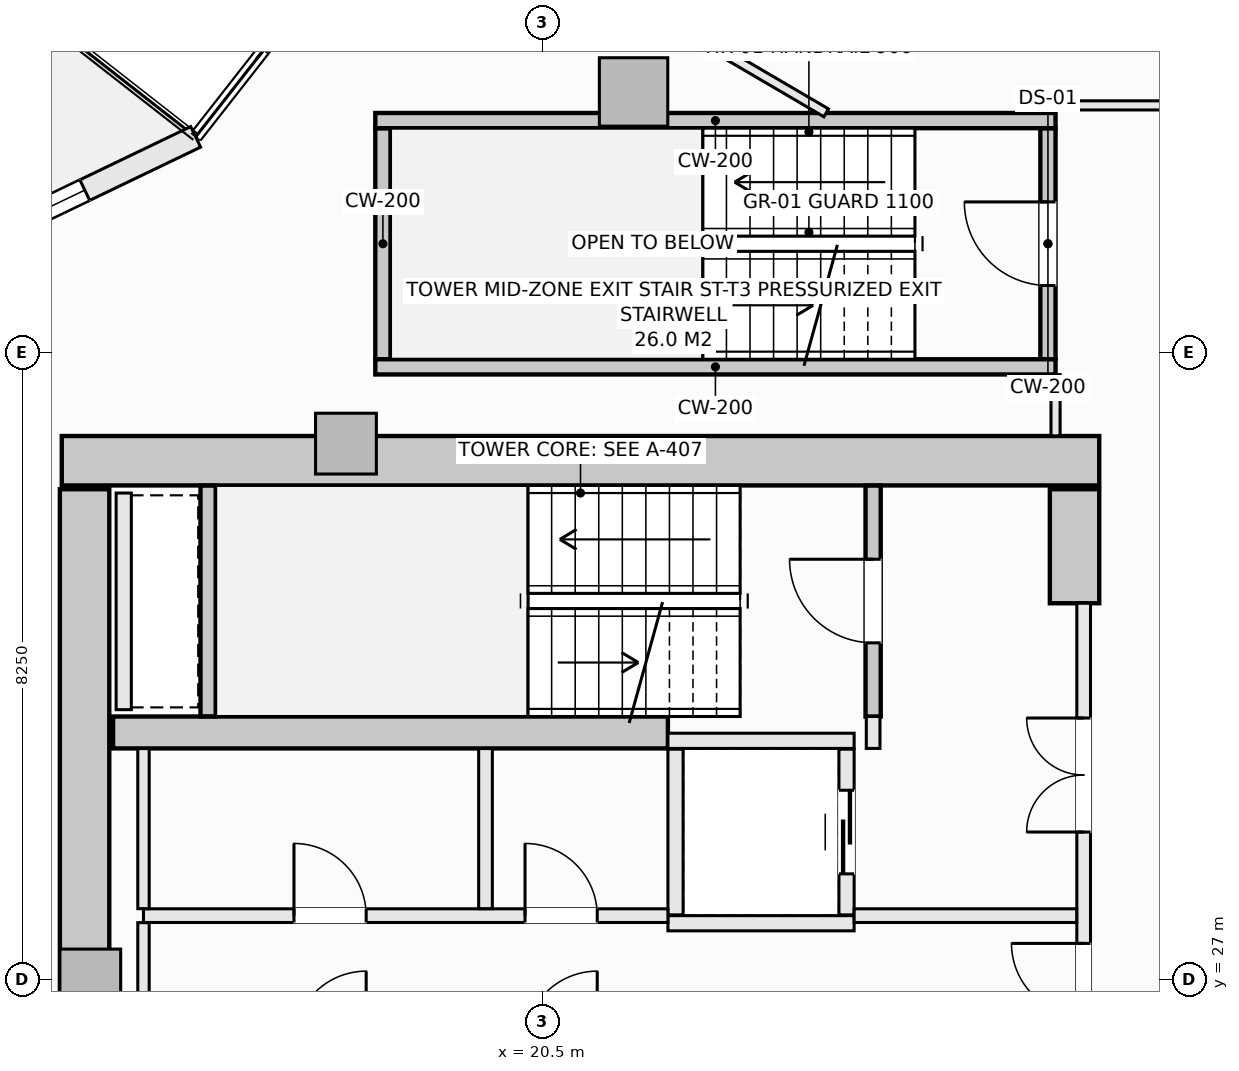
"""IFC4 building model, lengths in metres.
Left out: names, types, materials, properties, quantities, classifications, styles, units other than length and angle.
Written with IfcOpenShell. Run it as: python <this file> out.ifc"""

import sys

from ifc_helpers import new_model, si_unit, direction, frame, frame_2d, origin, origin_2d, place, context, subcontext, project, spatial, rectangle, extrude, element, fill, save


model = new_model("IFC4")
c1 = context("Model", 3, precision=1e-05, world=origin(), true_north=direction((0.0, 1.0)))
c2 = subcontext(c1, "Body", "Model", "MODEL_VIEW")
j1 = project(units=[si_unit("LENGTHUNIT", "METRE"), si_unit("PLANEANGLEUNIT", "RADIAN")], contexts=[c1])
p1 = place(None, origin())
s1 = spatial("IfcSite", under=j1, at=p1, CompositionType="ELEMENT")
p2 = place(p1, origin())
s2 = spatial("IfcBuilding", under=s1, at=p2, CompositionType="ELEMENT")
p3 = place(p2, frame((0.0, 0.0, 142.7)))
s3 = spatial("IfcBuildingStorey", under=s2, at=p3, CompositionType="ELEMENT", Elevation=142.7)
p4 = place(p3, frame((14.175, 33.825, -0.27), z_axis=(0.0, 0.0, 1.0), x_axis=(1.0, 0.0, 0.0)))
e1 = element("IfcWall", 1, at=p4, inside=s3, PredefinedType="SHEAR", context=c2, shape_type="SweptSolid", body=[
    extrude(rectangle(XDim=13.65, YDim=0.65, at=frame_2d((6.825, 0.0))), origin(), (0.0, 0.0, 1.0), 3.4),
])
p5 = place(p3, frame((14.475, 20.55, -0.27), z_axis=(0.0, 0.0, 1.0), x_axis=(0.0, 1.0, 0.0)))
e2 = element("IfcWall", 2, at=p5, inside=s3, PredefinedType="SHEAR", context=c2, shape_type="SweptSolid", body=[
    extrude(rectangle(XDim=12.9, YDim=0.65, at=frame_2d((6.45, 0.0))), origin(), (0.0, 0.0, 1.0), 3.4),
])
p6 = place(p3, frame((27.5, 31.95, -0.27), z_axis=(0.0, 0.0, 1.0), x_axis=(0.0, 1.0, 0.0)))
e3 = element("IfcWall", 3, at=p6, inside=s3, PredefinedType="SHEAR", context=c2, shape_type="SweptSolid", body=[
    extrude(rectangle(XDim=1.5, YDim=0.65, at=frame_2d((0.75, 0.0))), origin(), (0.0, 0.0, 1.0), 3.4),
])
p7 = place(p3, frame((14.85, 30.25, -0.27), z_axis=(0.0, 0.0, 1.0), x_axis=(1.0, 0.0, 0.0)))
e4 = element("IfcWall", 4, at=p7, inside=s3, PredefinedType="SHEAR", context=c2, shape_type="SweptSolid", body=[
    extrude(rectangle(XDim=7.3, YDim=0.42, at=frame_2d((3.65, 0.0))), origin(), (0.0, 0.0, 1.0), 3.4),
])
p8 = place(p3, frame((21.698, 38.677, -0.27), z_axis=(0.0, 0.0, 1.0), x_axis=(1.0, 0.0, 0.0)))
e5 = element("IfcColumn", 5, at=p8, inside=s3, PredefinedType="COLUMN", context=c2, shape_type="SweptSolid", body=[
    extrude(rectangle(XDim=0.9, YDim=0.9, at=origin_2d()), origin(), (0.0, 0.0, 1.0), 3.4),
])
for number, where, z_axis, x_axis in (
    (6, (17.914, 34.05, -0.27), (0.0, 0.0, 1.0), (1.0, 0.0, 0.0)),
    (7, (14.55, 27.0, -0.27), (0.0, 0.0, 1.0), (1.0, 0.0, 0.0)),
):
    element("IfcColumn", number, at=place(p3, frame(where, z_axis=z_axis, x_axis=x_axis)), inside=s3, PredefinedType="PILASTER", context=c2, shape_type="SweptSolid", body=[
        extrude(rectangle(XDim=0.8, YDim=0.8, at=origin_2d()), origin(), (0.0, 0.0, 1.0), 3.4),
    ])
p9 = place(p3, frame((11.127, 35.775, 0.0), z_axis=(0.0, 0.0, 1.0), x_axis=(0.901353070301, 0.433085029363, 0.0)))
e8 = element("IfcWall", 8, at=p9, inside=s3, PredefinedType="SOLIDWALL", context=c2, shape_type="SweptSolid", body=[
    extrude(rectangle(XDim=5.336, YDim=0.3, at=frame_2d((2.668, 0.0))), origin(), (0.0, 0.0, 1.0), 2.653),
])
p10 = place(p9, frame((1.618, 0.0, 0.74)))
e9 = element("IfcOpeningElement", 9, at=p10, cuts=e8, PredefinedType="OPENING", context=c2, shape_type="SweptSolid", body=[
    extrude(rectangle(XDim=2.1, YDim=1.7, at=frame_2d((1.05, 0.85))), frame((0.0, 0.16, 0.0), z_axis=(0.0, -1.0, 0.0), x_axis=(1.0, 0.0, 0.0)), (0.0, 0.0, 1.0), 0.32),
])
p11 = place(p3, frame((24.85, 30.46, -0.27), z_axis=(0.0, 0.0, 1.0), x_axis=(0.0, 1.0, 0.0)))
e10 = element("IfcWall", 10, at=p11, inside=s3, PredefinedType="SHEAR", context=c2, shape_type="SweptSolid", body=[
    extrude(rectangle(XDim=3.038, YDim=0.2, at=frame_2d((1.519, 0.0))), origin(), (0.0, 0.0, 1.0), 3.4),
])
p12 = place(p11, frame((0.969, 0.0, 0.27)))
e11 = element("IfcOpeningElement", 11, at=p12, cuts=e10, PredefinedType="OPENING", context=c2, shape_type="SweptSolid", body=[
    extrude(rectangle(XDim=1.1, YDim=2.15, at=frame_2d((0.55, 1.075))), frame((0.0, 0.11, 0.0), z_axis=(0.0, -1.0, 0.0), x_axis=(1.0, 0.0, 0.0)), (0.0, 0.0, 1.0), 0.22),
])
p13 = place(p3, frame((16.1, 30.462, -0.27), z_axis=(0.0, 0.0, 1.0), x_axis=(0.0, 1.0, 0.0)))
e12 = element("IfcWall", 12, at=p13, inside=s3, PredefinedType="SHEAR", context=c2, shape_type="SweptSolid", body=[
    extrude(rectangle(XDim=3.036, YDim=0.2, at=frame_2d((1.518, 0.0))), origin(), (0.0, 0.0, 1.0), 3.4),
])
p14 = place(p3, frame((27.15, 35.16, -0.27), z_axis=(0.0, 0.0, 1.0), x_axis=(0.0, 1.0, 0.0)))
e13 = element("IfcWall", 13, at=p14, inside=s3, PredefinedType="SHEAR", context=c2, shape_type="SweptSolid", body=[
    extrude(rectangle(XDim=3.04, YDim=0.2, at=frame_2d((1.52, 0.0))), origin(), (0.0, 0.0, 1.0), 3.4),
])
p15 = place(p14, frame((0.97, 0.0, 0.27)))
e14 = element("IfcOpeningElement", 14, at=p15, cuts=e13, PredefinedType="OPENING", context=c2, shape_type="SweptSolid", body=[
    extrude(rectangle(XDim=1.1, YDim=2.15, at=frame_2d((0.55, 1.075))), frame((0.0, 0.11, 0.0), z_axis=(0.0, -1.0, 0.0), x_axis=(1.0, 0.0, 0.0)), (0.0, 0.0, 1.0), 0.22),
])
p16 = place(p3, frame((18.4, 35.16, -0.27), z_axis=(0.0, 0.0, 1.0), x_axis=(0.0, 1.0, 0.0)))
e15 = element("IfcWall", 15, at=p16, inside=s3, PredefinedType="SHEAR", context=c2, shape_type="SweptSolid", body=[
    extrude(rectangle(XDim=3.04, YDim=0.2, at=frame_2d((1.52, 0.0))), origin(), (0.0, 0.0, 1.0), 3.4),
])
for number, where, z_axis, x_axis in (
    (16, (18.3, 38.3, -0.27), (0.0, 0.0, 1.0), (1.0, 0.0, 0.0)),
    (17, (18.3, 35.06, -0.27), (0.0, 0.0, 1.0), (1.0, 0.0, 0.0)),
):
    element("IfcWall", number, at=place(p3, frame(where, z_axis=z_axis, x_axis=x_axis)), inside=s3, PredefinedType="SHEAR", context=c2, shape_type="SweptSolid", body=[
        extrude(rectangle(XDim=8.95, YDim=0.2, at=frame_2d((4.475, 0.0))), origin(), (0.0, 0.0, 1.0), 3.4),
    ])
for number, where, z_axis, x_axis in (
    (18, (22.15, 30.14, 0.0), (0.0, 0.0, 1.0), (1.0, 0.0, 0.0)),
    (19, (22.15, 27.74, 0.0), (0.0, 0.0, 1.0), (1.0, 0.0, 0.0)),
):
    element("IfcWall", number, at=place(p3, frame(where, z_axis=z_axis, x_axis=x_axis)), inside=s3, PredefinedType="SOLIDWALL", context=c2, shape_type="SweptSolid", body=[
        extrude(rectangle(XDim=2.45, YDim=0.2, at=frame_2d((1.225, 0.0))), origin(), (0.0, 0.0, 1.0), 3.13),
    ])
p17 = place(p3, frame((22.25, 27.85, 0.0), z_axis=(0.0, 0.0, 1.0), x_axis=(0.0, 1.0, 0.0)))
e20 = element("IfcWall", 20, at=p17, inside=s3, PredefinedType="SOLIDWALL", context=c2, shape_type="SweptSolid", body=[
    extrude(rectangle(XDim=2.18, YDim=0.2, at=frame_2d((1.09, 0.0))), origin(), (0.0, 0.0, 1.0), 3.13),
])
p18 = place(p3, frame((24.5, 27.85, 0.0), z_axis=(0.0, 0.0, 1.0), x_axis=(0.0, 1.0, 0.0)))
e21 = element("IfcWall", 21, at=p18, inside=s3, PredefinedType="SOLIDWALL", context=c2, shape_type="SweptSolid", body=[
    extrude(rectangle(XDim=2.18, YDim=0.2, at=frame_2d((1.09, 0.0))), origin(), (0.0, 0.0, 1.0), 3.13),
])
p19 = place(p18, frame((0.54, 0.0, 0.0)))
e22 = element("IfcOpeningElement", 22, at=p19, cuts=e21, PredefinedType="OPENING", context=c2, shape_type="SweptSolid", body=[
    extrude(rectangle(XDim=1.1, YDim=2.2, at=frame_2d((0.55, 1.1))), frame((0.0, 0.11, 0.0), z_axis=(0.0, -1.0, 0.0), x_axis=(1.0, 0.0, 0.0)), (0.0, 0.0, 1.0), 0.22),
])
p20 = place(p3, frame((14.99, 30.55, 0.0), z_axis=(0.0, 0.0, 1.0), x_axis=(0.0, 1.0, 0.0)))
e23 = element("IfcWall", 23, at=p20, inside=s3, PredefinedType="SOLIDWALL", context=c2, shape_type="SweptSolid", body=[
    extrude(rectangle(XDim=2.85, YDim=0.2, at=frame_2d((1.425, 0.0))), origin(), (0.0, 0.0, 1.0), 3.13),
])
p21 = place(p3, frame((24.85, 30.04, 0.0), z_axis=(0.0, 0.0, 1.0), x_axis=(0.0, 1.0, 0.0)))
e24 = element("IfcWall", 24, at=p21, inside=s3, PredefinedType="SOLIDWALL", context=c2, shape_type="SweptSolid", body=[
    extrude(rectangle(XDim=0.42, YDim=0.18, at=frame_2d((0.21, 0.0))), origin(), (0.0, 0.0, 1.0), 3.13),
])
p22 = place(p3, frame((27.62, 22.05, 0.0), z_axis=(0.0, 0.0, 1.0), x_axis=(0.0, 1.0, 0.0)))
e25 = element("IfcWall", 25, at=p22, inside=s3, PredefinedType="SOLIDWALL", context=c2, shape_type="SweptSolid", body=[
    extrude(rectangle(XDim=9.9, YDim=0.18, at=frame_2d((4.95, 0.0))), origin(), (0.0, 0.0, 1.0), 3.13),
])
p23 = place(p22, frame((4.475, 0.0, 0.0)))
e26 = element("IfcOpeningElement", 26, at=p23, cuts=e25, PredefinedType="OPENING", context=c2, shape_type="SweptSolid", body=[
    extrude(rectangle(XDim=0.95, YDim=2.1, at=frame_2d((0.475, 1.05))), frame((0.0, 0.1, 0.0), z_axis=(0.0, -1.0, 0.0), x_axis=(1.0, 0.0, 0.0)), (0.0, 0.0, 1.0), 0.2),
])
p24 = place(p22, frame((6.89, 0.0, 0.0)))
e27 = element("IfcOpeningElement", 27, at=p24, cuts=e25, PredefinedType="OPENING", context=c2, shape_type="SweptSolid", body=[
    extrude(rectangle(XDim=1.5, YDim=2.2, at=frame_2d((0.75, 1.1))), frame((0.0, 0.1, 0.0), z_axis=(0.0, -1.0, 0.0), x_axis=(1.0, 0.0, 0.0)), (0.0, 0.0, 1.0), 0.2),
])
p25 = place(p22, frame((1.51, 0.0, 0.0)))
e28 = element("IfcOpeningElement", 28, at=p25, cuts=e25, PredefinedType="OPENING", context=c2, shape_type="SweptSolid", body=[
    extrude(rectangle(XDim=1.5, YDim=2.2, at=frame_2d((0.75, 1.1))), frame((0.0, 0.1, 0.0), z_axis=(0.0, -1.0, 0.0), x_axis=(1.0, 0.0, 0.0)), (0.0, 0.0, 1.0), 0.2),
])
p26 = place(p3, frame((15.25, 27.84, 0.0), z_axis=(0.0, 0.0, 1.0), x_axis=(1.0, 0.0, 0.0)))
e29 = element("IfcWall", 29, at=p26, inside=s3, PredefinedType="SOLIDWALL", context=c2, shape_type="SweptSolid", body=[
    extrude(rectangle(XDim=6.9, YDim=0.18, at=frame_2d((3.45, 0.0))), origin(), (0.0, 0.0, 1.0), 3.13),
])
p27 = place(p26, frame((5.02, 0.0, 0.0)))
e30 = element("IfcOpeningElement", 30, at=p27, cuts=e29, PredefinedType="OPENING", context=c2, shape_type="SweptSolid", body=[
    extrude(rectangle(XDim=0.95, YDim=2.1, at=frame_2d((0.475, 1.05))), frame((0.0, 0.1, 0.0), z_axis=(0.0, -1.0, 0.0), x_axis=(1.0, 0.0, 0.0)), (0.0, 0.0, 1.0), 0.2),
])
p28 = place(p26, frame((1.98, 0.0, 0.0)))
e31 = element("IfcOpeningElement", 31, at=p28, cuts=e29, PredefinedType="OPENING", context=c2, shape_type="SweptSolid", body=[
    extrude(rectangle(XDim=0.95, YDim=2.1, at=frame_2d((0.475, 1.05))), frame((0.0, 0.1, 0.0), z_axis=(0.0, -1.0, 0.0), x_axis=(1.0, 0.0, 0.0)), (0.0, 0.0, 1.0), 0.2),
])
p29 = place(p3, frame((24.6, 27.84, 0.0), z_axis=(0.0, 0.0, 1.0), x_axis=(1.0, 0.0, 0.0)))
e32 = element("IfcWall", 32, at=p29, inside=s3, PredefinedType="SOLIDWALL", context=c2, shape_type="SweptSolid", body=[
    extrude(rectangle(XDim=2.928, YDim=0.18, at=frame_2d((1.464, 0.0))), origin(), (0.0, 0.0, 1.0), 3.13),
])
p30 = place(p3, frame((15.25, 26.252, 0.0), z_axis=(0.0, 0.0, 1.0), x_axis=(0.0, 1.0, 0.0)))
e33 = element("IfcWall", 33, at=p30, inside=s3, PredefinedType="PARTITIONING", context=c2, shape_type="SweptSolid", body=[
    extrude(rectangle(XDim=1.496, YDim=0.15, at=frame_2d((0.748, 0.0))), origin(), (0.0, 0.0, 1.0), 3.13),
])
p31 = place(p3, frame((15.25, 27.932, 0.0), z_axis=(0.0, 0.0, 1.0), x_axis=(0.0, 1.0, 0.0)))
e34 = element("IfcWall", 34, at=p31, inside=s3, PredefinedType="PARTITIONING", context=c2, shape_type="SweptSolid", body=[
    extrude(rectangle(XDim=2.106, YDim=0.15, at=frame_2d((1.053, 0.0))), origin(), (0.0, 0.0, 1.0), 3.13),
])
p32 = place(p3, frame((19.75, 27.932, 0.0), z_axis=(0.0, 0.0, 1.0), x_axis=(0.0, 1.0, 0.0)))
e35 = element("IfcWall", 35, at=p32, inside=s3, PredefinedType="SOLIDWALL", context=c2, shape_type="SweptSolid", body=[
    extrude(rectangle(XDim=2.106, YDim=0.18, at=frame_2d((1.053, 0.0))), origin(), (0.0, 0.0, 1.0), 3.13),
])
p33 = place(p3, frame((27.25, 34.152, 0.0), z_axis=(0.0, 0.0, 1.0), x_axis=(0.0, 1.0, 0.0)))
e36 = element("IfcWall", 36, at=p33, inside=s3, PredefinedType="PARTITIONING", context=c2, shape_type="SweptSolid", body=[
    extrude(rectangle(XDim=0.806, YDim=0.12, at=frame_2d((0.403, 0.0))), origin(), (0.0, 0.0, 1.0), 3.13),
])
p34 = place(p3, frame((27.25, 38.5, 0.0), z_axis=(0.0, 0.0, 1.0), x_axis=(1.0, 0.0, 0.0)))
e37 = element("IfcWall", 37, at=p34, inside=s3, PredefinedType="PARTITIONING", context=c2, shape_type="SweptSolid", body=[
    extrude(rectangle(XDim=2.53, YDim=0.12, at=frame_2d((1.265, 0.0))), origin(), (0.0, 0.0, 1.0), 3.13),
])
p35 = place(p3, frame((18.811, 41.576, 0.0), z_axis=(0.0, 0.0, 1.0), x_axis=(0.862957437205, -0.505276618866, 0.0)))
e38 = element("IfcWall", 38, at=p35, inside=s3, PredefinedType="PARTITIONING", context=c2, shape_type="SweptSolid", body=[
    extrude(rectangle(XDim=6.282, YDim=0.12, at=frame_2d((3.141, 0.0))), origin(), (0.0, 0.0, 1.0), 2.505),
])
p36 = place(p10, origin())
e39 = element("IfcWindow", 39, at=p36, inside=s3, PartitioningType="SINGLE_PANEL", PredefinedType="WINDOW", context=c2, shape_type="SweptSolid", body=[
    extrude(rectangle(XDim=2.1, YDim=1.7, at=frame_2d((1.05, 0.85))), frame((0.0, 0.03, 0.0), z_axis=(0.0, -1.0, 0.0), x_axis=(1.0, 0.0, 0.0)), (0.0, 0.0, 1.0), 0.06),
])
fill(e9, e39)
p37 = place(p12, origin())
e40 = element("IfcDoor", 40, at=p37, inside=s3, OperationType="SINGLE_SWING_RIGHT", PredefinedType="DOOR", context=c2, shape_type="SweptSolid", body=[
    extrude(rectangle(XDim=1.1, YDim=2.15, at=frame_2d((0.55, 1.075))), frame((0.0, 0.025, 0.0), z_axis=(0.0, -1.0, 0.0), x_axis=(1.0, 0.0, 0.0)), (0.0, 0.0, 1.0), 0.05),
])
fill(e11, e40)
p38 = place(p15, origin())
e41 = element("IfcDoor", 41, at=p38, inside=s3, OperationType="SINGLE_SWING_RIGHT", PredefinedType="DOOR", context=c2, shape_type="SweptSolid", body=[
    extrude(rectangle(XDim=1.1, YDim=2.15, at=frame_2d((0.55, 1.075))), frame((0.0, 0.025, 0.0), z_axis=(0.0, -1.0, 0.0), x_axis=(1.0, 0.0, 0.0)), (0.0, 0.0, 1.0), 0.05),
])
fill(e14, e41)
p39 = place(p19, origin())
e42 = element("IfcDoor", 42, at=p39, inside=s3, OperationType="SLIDING_TO_LEFT", PredefinedType="DOOR", context=c2, shape_type="SweptSolid", body=[
    extrude(rectangle(XDim=1.1, YDim=2.2, at=frame_2d((0.55, 1.1))), frame((0.0, 0.025, 0.0), z_axis=(0.0, -1.0, 0.0), x_axis=(1.0, 0.0, 0.0)), (0.0, 0.0, 1.0), 0.05),
])
fill(e22, e42)
p40 = place(p23, origin())
e43 = element("IfcDoor", 43, at=p40, inside=s3, OperationType="SINGLE_SWING_RIGHT", PredefinedType="DOOR", context=c2, shape_type="SweptSolid", body=[
    extrude(rectangle(XDim=0.95, YDim=2.1, at=frame_2d((0.475, 1.05))), frame((0.0, 0.025, 0.0), z_axis=(0.0, -1.0, 0.0), x_axis=(1.0, 0.0, 0.0)), (0.0, 0.0, 1.0), 0.05),
])
fill(e26, e43)
p41 = place(p24, origin())
e44 = element("IfcDoor", 44, at=p41, inside=s3, OperationType="DOUBLE_DOOR_SINGLE_SWING", PredefinedType="DOOR", context=c2, shape_type="SweptSolid", body=[
    extrude(rectangle(XDim=1.5, YDim=2.2, at=frame_2d((0.75, 1.1))), frame((0.0, 0.025, 0.0), z_axis=(0.0, -1.0, 0.0), x_axis=(1.0, 0.0, 0.0)), (0.0, 0.0, 1.0), 0.05),
])
fill(e27, e44)
p42 = place(p27, origin())
e45 = element("IfcDoor", 45, at=p42, inside=s3, OperationType="SINGLE_SWING_LEFT", PredefinedType="DOOR", context=c2, shape_type="SweptSolid", body=[
    extrude(rectangle(XDim=0.95, YDim=2.1, at=frame_2d((0.475, 1.05))), frame((0.0, 0.025, 0.0), z_axis=(0.0, -1.0, 0.0), x_axis=(1.0, 0.0, 0.0)), (0.0, 0.0, 1.0), 0.05),
])
fill(e30, e45)
p43 = place(p28, origin())
e46 = element("IfcDoor", 46, at=p43, inside=s3, OperationType="SINGLE_SWING_LEFT", PredefinedType="DOOR", context=c2, shape_type="SweptSolid", body=[
    extrude(rectangle(XDim=0.95, YDim=2.1, at=frame_2d((0.475, 1.05))), frame((0.0, 0.025, 0.0), z_axis=(0.0, -1.0, 0.0), x_axis=(1.0, 0.0, 0.0)), (0.0, 0.0, 1.0), 0.05),
])
fill(e31, e46)
save(model, sys.argv[1])
